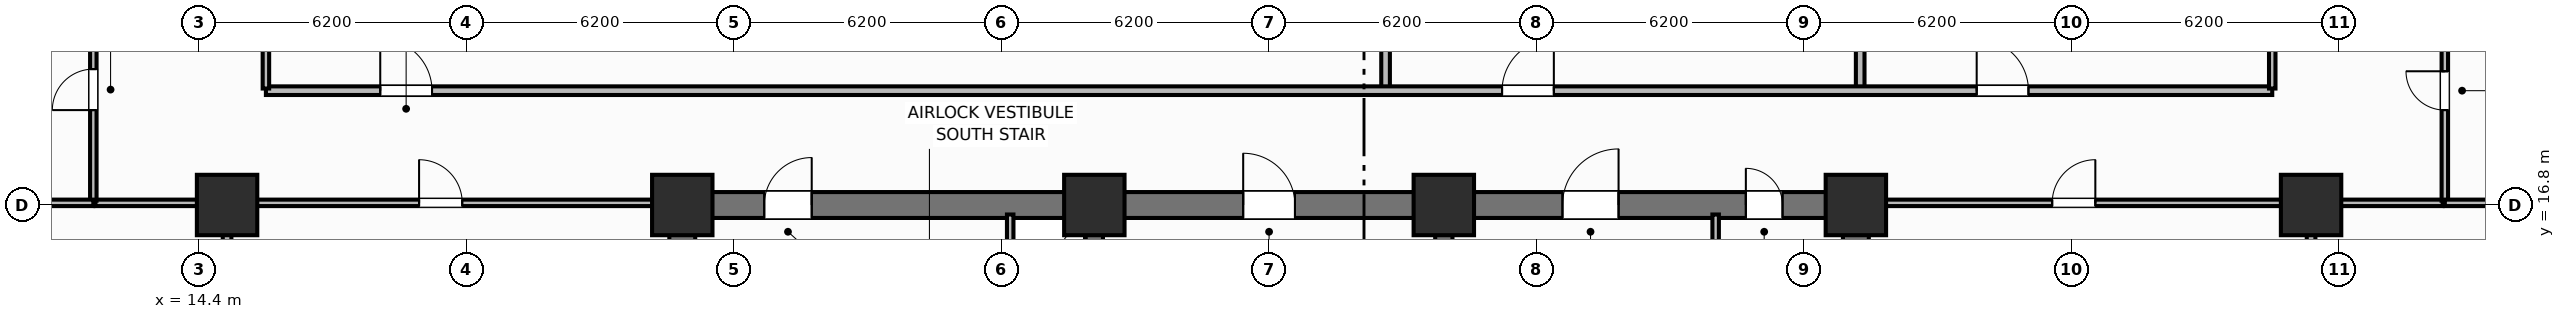
"""IFC4 building model, lengths in metres.
Left out: names, types, materials, properties, quantities, classifications, styles, units other than length and angle.
Written with IfcOpenShell. Run it as: python <this file> out.ifc"""

import sys

from ifc_helpers import new_model, si_unit, direction, frame, frame_2d, origin, origin_2d, place, context, subcontext, project, spatial, rectangle, extrude, element, fill, save


model = new_model("IFC4")
c1 = context("Model", 3, precision=1e-05, world=origin(), true_north=direction((0.0, 1.0)))
c2 = subcontext(c1, "Body", "Model", "MODEL_VIEW")
j1 = project(units=[si_unit("LENGTHUNIT", "METRE"), si_unit("PLANEANGLEUNIT", "RADIAN")], contexts=[c1])
p1 = place(None, origin())
s1 = spatial("IfcSite", under=j1, at=p1, CompositionType="ELEMENT")
p2 = place(p1, origin())
s2 = spatial("IfcBuilding", under=s1, at=p2, CompositionType="ELEMENT")
p3 = place(p2, frame((0.0, 0.0, 11.1)))
s3 = spatial("IfcBuildingStorey", under=s2, at=p3, CompositionType="ELEMENT", Elevation=11.1)
for number, where, z_axis, x_axis in (
    (1, (25.6, 10.9, 0.0), (0.0, 0.0, 1.0), (0.0, 1.0, 0.0)),
    (2, (52.8, 10.9, 0.0), (0.0, 0.0, 1.0), (0.0, 1.0, 0.0)),
):
    element("IfcWall", number, at=place(p3, frame(where, z_axis=z_axis, x_axis=x_axis)), inside=s3, PredefinedType="SHEAR", context=c2, shape_type="SweptSolid", body=[
        extrude(rectangle(XDim=5.6, YDim=0.6, at=frame_2d((2.8, 0.0))), origin(), (0.0, 0.0, 1.0), 4.5),
    ])
p4 = place(p3, frame((25.6, 16.8, 0.0), z_axis=(0.0, 0.0, 1.0), x_axis=(1.0, 0.0, 0.0)))
e3 = element("IfcWall", 3, at=p4, inside=s3, PredefinedType="SHEAR", context=c2, shape_type="SweptSolid", body=[
    extrude(rectangle(XDim=27.2, YDim=0.6, at=frame_2d((13.6, 0.0))), origin(), (0.0, 0.0, 1.0), 4.5),
])
p5 = place(p4, frame((1.9, 0.0, 0.0)))
e4 = element("IfcOpeningElement", 4, at=p5, cuts=e3, PredefinedType="OPENING", context=c2, shape_type="SweptSolid", body=[
    extrude(rectangle(XDim=1.1, YDim=2.15, at=frame_2d((0.55, 1.075))), frame((0.0, 0.31, 0.0), z_axis=(0.0, -1.0, 0.0), x_axis=(1.0, 0.0, 0.0)), (0.0, 0.0, 1.0), 0.62),
])
p6 = place(p4, frame((13.0, 0.0, 0.0)))
e5 = element("IfcOpeningElement", 5, at=p6, cuts=e3, PredefinedType="OPENING", context=c2, shape_type="SweptSolid", body=[
    extrude(rectangle(XDim=1.2, YDim=2.15, at=frame_2d((0.6, 1.075))), frame((0.0, 0.31, 0.0), z_axis=(0.0, -1.0, 0.0), x_axis=(1.0, 0.0, 0.0)), (0.0, 0.0, 1.0), 0.62),
])
p7 = place(p4, frame((20.4, 0.0, 0.0)))
e6 = element("IfcOpeningElement", 6, at=p7, cuts=e3, PredefinedType="OPENING", context=c2, shape_type="SweptSolid", body=[
    extrude(rectangle(XDim=1.3, YDim=2.2, at=frame_2d((0.65, 1.1))), frame((0.0, 0.31, 0.0), z_axis=(0.0, -1.0, 0.0), x_axis=(1.0, 0.0, 0.0)), (0.0, 0.0, 1.0), 0.62),
])
p8 = place(p4, frame((24.65, 0.0, 0.0)))
e7 = element("IfcOpeningElement", 7, at=p8, cuts=e3, PredefinedType="OPENING", context=c2, shape_type="SweptSolid", body=[
    extrude(rectangle(XDim=0.85, YDim=2.1, at=frame_2d((0.425, 1.05))), frame((0.0, 0.31, 0.0), z_axis=(0.0, -1.0, 0.0), x_axis=(1.0, 0.0, 0.0)), (0.0, 0.0, 1.0), 0.62),
])
for number, where, z_axis, x_axis in (
    (8, (35.15, 10.9, 0.0), (0.0, 0.0, 1.0), (0.0, 1.0, 0.0)),
    (9, (43.25, 10.9, 0.0), (0.0, 0.0, 1.0), (0.0, 1.0, 0.0)),
):
    element("IfcWall", number, at=place(p3, frame(where, z_axis=z_axis, x_axis=x_axis)), inside=s3, PredefinedType="SHEAR", context=c2, shape_type="SweptSolid", body=[
        extrude(rectangle(XDim=5.6, YDim=0.4, at=frame_2d((2.8, 0.0))), origin(), (0.0, 0.0, 1.0), 4.5),
    ])
for number, where, z_axis, x_axis in (
    (10, (25.6, 16.8, 0.0), (0.0, 0.0, 1.0), (1.0, 0.0, 0.0)),
    (11, (35.15, 16.8, 0.0), (0.0, 0.0, 1.0), (1.0, 0.0, 0.0)),
    (12, (43.25, 16.8, 0.0), (0.0, 0.0, 1.0), (1.0, 0.0, 0.0)),
    (13, (52.8, 16.8, 0.0), (0.0, 0.0, 1.0), (1.0, 0.0, 0.0)),
    (14, (15.05, 16.8, 0.0), (0.0, 0.0, 1.0), (1.0, 0.0, 0.0)),
    (15, (63.35, 16.8, 0.0), (0.0, 0.0, 1.0), (1.0, 0.0, 0.0)),
):
    element("IfcColumn", number, at=place(p3, frame(where, z_axis=z_axis, x_axis=x_axis)), inside=s3, PredefinedType="COLUMN", context=c2, shape_type="SweptSolid", body=[
        extrude(rectangle(XDim=1.4, YDim=1.4, at=origin_2d()), origin(), (0.0, 0.0, 1.0), 4.5),
    ])
p9 = place(p3, frame((33.2, 14.5, 0.0), z_axis=(0.0, 0.0, 1.0), x_axis=(0.0, 1.0, 0.0)))
e16 = element("IfcWall", 16, at=p9, inside=s3, PredefinedType="PARTITIONING", context=c2, shape_type="SweptSolid", body=[
    extrude(rectangle(XDim=2.08, YDim=0.15, at=frame_2d((1.04, 0.0))), origin(), (0.0, 0.0, 1.0), 3.42),
])
p10 = place(p9, frame((0.55, 0.0, 0.0)))
e17 = element("IfcOpeningElement", 17, at=p10, cuts=e16, PredefinedType="OPENING", context=c2, shape_type="SweptSolid", body=[
    extrude(rectangle(XDim=0.85, YDim=2.05, at=frame_2d((0.425, 1.025))), frame((0.0, 0.085, 0.0), z_axis=(0.0, -1.0, 0.0), x_axis=(1.0, 0.0, 0.0)), (0.0, 0.0, 1.0), 0.17),
])
p11 = place(p3, frame((49.55, 13.7, 0.0), z_axis=(0.0, 0.0, 1.0), x_axis=(0.0, 1.0, 0.0)))
e18 = element("IfcWall", 18, at=p11, inside=s3, PredefinedType="PARTITIONING", context=c2, shape_type="SweptSolid", body=[
    extrude(rectangle(XDim=2.88, YDim=0.15, at=frame_2d((1.44, 0.0))), origin(), (0.0, 0.0, 1.0), 3.42),
])
for number, where, z_axis, x_axis in (
    (19, (41.9, 19.5, 0.0), (0.0, 0.0, 1.0), (0.0, 1.0, 0.0)),
    (20, (52.9, 19.5, 0.0), (0.0, 0.0, 1.0), (0.0, 1.0, 0.0)),
):
    element("IfcWall", number, at=place(p3, frame(where, z_axis=z_axis, x_axis=x_axis)), inside=s3, PredefinedType="PARTITIONING", context=c2, shape_type="SweptSolid", body=[
        extrude(rectangle(XDim=17.4, YDim=0.2, at=frame_2d((8.7, 0.0))), origin(), (0.0, 0.0, 1.0), 3.42),
    ])
p12 = place(p3, frame((15.95, 19.45, 0.0), z_axis=(0.0, 0.0, 1.0), x_axis=(1.0, 0.0, 0.0)))
e21 = element("IfcWall", 21, at=p12, inside=s3, PredefinedType="PARTITIONING", context=c2, shape_type="SweptSolid", body=[
    extrude(rectangle(XDim=46.5, YDim=0.2, at=frame_2d((23.25, 0.0))), origin(), (0.0, 0.0, 1.0), 3.42),
])
p13 = place(p12, frame((2.65, 0.0, 0.0)))
e22 = element("IfcOpeningElement", 22, at=p13, cuts=e21, PredefinedType="OPENING", context=c2, shape_type="SweptSolid", body=[
    extrude(rectangle(XDim=1.2, YDim=2.15, at=frame_2d((0.6, 1.075))), frame((0.0, 0.11, 0.0), z_axis=(0.0, -1.0, 0.0), x_axis=(1.0, 0.0, 0.0)), (0.0, 0.0, 1.0), 0.22),
])
p14 = place(p12, frame((28.65, 0.0, 0.0)))
e23 = element("IfcOpeningElement", 23, at=p14, cuts=e21, PredefinedType="OPENING", context=c2, shape_type="SweptSolid", body=[
    extrude(rectangle(XDim=1.2, YDim=2.15, at=frame_2d((0.6, 1.075))), frame((0.0, 0.11, 0.0), z_axis=(0.0, -1.0, 0.0), x_axis=(1.0, 0.0, 0.0)), (0.0, 0.0, 1.0), 0.22),
])
p15 = place(p12, frame((39.65, 0.0, 0.0)))
e24 = element("IfcOpeningElement", 24, at=p15, cuts=e21, PredefinedType="OPENING", context=c2, shape_type="SweptSolid", body=[
    extrude(rectangle(XDim=1.2, YDim=2.15, at=frame_2d((0.6, 1.075))), frame((0.0, 0.11, 0.0), z_axis=(0.0, -1.0, 0.0), x_axis=(1.0, 0.0, 0.0)), (0.0, 0.0, 1.0), 0.22),
])
for number, where, z_axis, x_axis in (
    (25, (15.95, 19.5, 0.0), (0.0, 0.0, 1.0), (0.0, 1.0, 0.0)),
    (26, (62.45, 19.5, 0.0), (0.0, 0.0, 1.0), (0.0, 1.0, 0.0)),
):
    element("IfcWall", number, at=place(p3, frame(where, z_axis=z_axis, x_axis=x_axis)), inside=s3, PredefinedType="PARTITIONING", context=c2, shape_type="SweptSolid", body=[
        extrude(rectangle(XDim=17.4, YDim=0.15, at=frame_2d((8.7, 0.0))), origin(), (0.0, 0.0, 1.0), 3.42),
    ])
p16 = place(p3, frame((15.05, 0.4, 0.0), z_axis=(0.0, 0.0, 1.0), x_axis=(0.0, 1.0, 0.0)))
e27 = element("IfcWall", 27, at=p16, inside=s3, PredefinedType="PARTITIONING", context=c2, shape_type="SweptSolid", body=[
    extrude(rectangle(XDim=16.4, YDim=0.2, at=frame_2d((8.2, 0.0))), origin(), (0.0, 0.0, 1.0), 3.42),
])
p17 = place(p16, frame((5.5, 0.0, 0.0)))
e28 = element("IfcOpeningElement", 28, at=p17, cuts=e27, PredefinedType="OPENING", context=c2, shape_type="SweptSolid", body=[
    extrude(rectangle(XDim=1.0, YDim=2.15, at=frame_2d((0.5, 1.075))), frame((0.0, 0.11, 0.0), z_axis=(0.0, -1.0, 0.0), x_axis=(1.0, 0.0, 0.0)), (0.0, 0.0, 1.0), 0.22),
])
p18 = place(p3, frame((12.0, 16.85, 0.0), z_axis=(0.0, 0.0, 1.0), x_axis=(1.0, 0.0, 0.0)))
e29 = element("IfcWall", 29, at=p18, inside=s3, PredefinedType="PARTITIONING", context=c2, shape_type="SweptSolid", body=[
    extrude(rectangle(XDim=13.25, YDim=0.15, at=frame_2d((6.625, 0.0))), origin(), (0.0, 0.0, 1.0), 3.42),
])
p19 = place(p18, frame((7.5, 0.0, 0.0)))
e30 = element("IfcOpeningElement", 30, at=p19, cuts=e29, PredefinedType="OPENING", context=c2, shape_type="SweptSolid", body=[
    extrude(rectangle(XDim=1.0, YDim=2.15, at=frame_2d((0.5, 1.075))), frame((0.0, 0.085, 0.0), z_axis=(0.0, -1.0, 0.0), x_axis=(1.0, 0.0, 0.0)), (0.0, 0.0, 1.0), 0.17),
])
p20 = place(p3, frame((11.95, 16.9, 0.0), z_axis=(0.0, 0.0, 1.0), x_axis=(0.0, 1.0, 0.0)))
e31 = element("IfcWall", 31, at=p20, inside=s3, PredefinedType="PARTITIONING", context=c2, shape_type="SweptSolid", body=[
    extrude(rectangle(XDim=5.65, YDim=0.15, at=frame_2d((2.825, 0.0))), origin(), (0.0, 0.0, 1.0), 3.42),
])
p21 = place(p20, frame((2.1, 0.0, 0.0)))
e32 = element("IfcOpeningElement", 32, at=p21, cuts=e31, PredefinedType="OPENING", context=c2, shape_type="SweptSolid", body=[
    extrude(rectangle(XDim=0.95, YDim=2.1, at=frame_2d((0.475, 1.05))), frame((0.0, 0.085, 0.0), z_axis=(0.0, -1.0, 0.0), x_axis=(1.0, 0.0, 0.0)), (0.0, 0.0, 1.0), 0.17),
])
p22 = place(p3, frame((0.4, 16.85, 0.0), z_axis=(0.0, 0.0, 1.0), x_axis=(1.0, 0.0, 0.0)))
e33 = element("IfcWall", 33, at=p22, inside=s3, PredefinedType="PARTITIONING", context=c2, shape_type="SweptSolid", body=[
    extrude(rectangle(XDim=11.55, YDim=0.15, at=frame_2d((5.775, 0.0))), origin(), (0.0, 0.0, 1.0), 3.42),
])
p23 = place(p3, frame((63.35, 0.4, 0.0), z_axis=(0.0, 0.0, 1.0), x_axis=(0.0, 1.0, 0.0)))
e34 = element("IfcWall", 34, at=p23, inside=s3, PredefinedType="PARTITIONING", context=c2, shape_type="SweptSolid", body=[
    extrude(rectangle(XDim=16.4, YDim=0.2, at=frame_2d((8.2, 0.0))), origin(), (0.0, 0.0, 1.0), 3.42),
])
p24 = place(p23, frame((5.5, 0.0, 0.0)))
e35 = element("IfcOpeningElement", 35, at=p24, cuts=e34, PredefinedType="OPENING", context=c2, shape_type="SweptSolid", body=[
    extrude(rectangle(XDim=1.0, YDim=2.15, at=frame_2d((0.5, 1.075))), frame((0.0, 0.11, 0.0), z_axis=(0.0, -1.0, 0.0), x_axis=(1.0, 0.0, 0.0)), (0.0, 0.0, 1.0), 0.22),
])
p25 = place(p3, frame((53.15, 16.85, 0.0), z_axis=(0.0, 0.0, 1.0), x_axis=(1.0, 0.0, 0.0)))
e36 = element("IfcWall", 36, at=p25, inside=s3, PredefinedType="PARTITIONING", context=c2, shape_type="SweptSolid", body=[
    extrude(rectangle(XDim=13.25, YDim=0.15, at=frame_2d((6.625, 0.0))), origin(), (0.0, 0.0, 1.0), 3.42),
])
p26 = place(p25, frame((4.2, 0.0, 0.0)))
e37 = element("IfcOpeningElement", 37, at=p26, cuts=e36, PredefinedType="OPENING", context=c2, shape_type="SweptSolid", body=[
    extrude(rectangle(XDim=1.0, YDim=2.15, at=frame_2d((0.5, 1.075))), frame((0.0, 0.085, 0.0), z_axis=(0.0, -1.0, 0.0), x_axis=(1.0, 0.0, 0.0)), (0.0, 0.0, 1.0), 0.17),
])
p27 = place(p3, frame((66.45, 16.9, 0.0), z_axis=(0.0, 0.0, 1.0), x_axis=(0.0, 1.0, 0.0)))
e38 = element("IfcWall", 38, at=p27, inside=s3, PredefinedType="PARTITIONING", context=c2, shape_type="SweptSolid", body=[
    extrude(rectangle(XDim=5.65, YDim=0.15, at=frame_2d((2.825, 0.0))), origin(), (0.0, 0.0, 1.0), 3.42),
])
p28 = place(p27, frame((2.1, 0.0, 0.0)))
e39 = element("IfcOpeningElement", 39, at=p28, cuts=e38, PredefinedType="OPENING", context=c2, shape_type="SweptSolid", body=[
    extrude(rectangle(XDim=0.9, YDim=2.1, at=frame_2d((0.45, 1.05))), frame((0.0, 0.085, 0.0), z_axis=(0.0, -1.0, 0.0), x_axis=(1.0, 0.0, 0.0)), (0.0, 0.0, 1.0), 0.17),
])
p29 = place(p3, frame((66.45, 16.85, 0.0), z_axis=(0.0, 0.0, 1.0), x_axis=(1.0, 0.0, 0.0)))
e40 = element("IfcWall", 40, at=p29, inside=s3, PredefinedType="PARTITIONING", context=c2, shape_type="SweptSolid", body=[
    extrude(rectangle(XDim=11.55, YDim=0.15, at=frame_2d((5.775, 0.0))), origin(), (0.0, 0.0, 1.0), 3.42),
])
p30 = place(p13, origin())
e41 = element("IfcDoor", 41, at=p30, inside=s3, OperationType="SINGLE_SWING_LEFT", PredefinedType="DOOR", context=c2, shape_type="SweptSolid", body=[
    extrude(rectangle(XDim=1.2, YDim=2.15, at=frame_2d((0.6, 1.075))), frame((0.0, 0.025, 0.0), z_axis=(0.0, -1.0, 0.0), x_axis=(1.0, 0.0, 0.0)), (0.0, 0.0, 1.0), 0.05),
])
fill(e22, e41)
p31 = place(p14, origin())
e42 = element("IfcDoor", 42, at=p31, inside=s3, OperationType="SINGLE_SWING_RIGHT", PredefinedType="DOOR", context=c2, shape_type="SweptSolid", body=[
    extrude(rectangle(XDim=1.2, YDim=2.15, at=frame_2d((0.6, 1.075))), frame((0.0, 0.025, 0.0), z_axis=(0.0, -1.0, 0.0), x_axis=(1.0, 0.0, 0.0)), (0.0, 0.0, 1.0), 0.05),
])
fill(e23, e42)
p32 = place(p15, origin())
e43 = element("IfcDoor", 43, at=p32, inside=s3, OperationType="SINGLE_SWING_LEFT", PredefinedType="DOOR", context=c2, shape_type="SweptSolid", body=[
    extrude(rectangle(XDim=1.2, YDim=2.15, at=frame_2d((0.6, 1.075))), frame((0.0, 0.025, 0.0), z_axis=(0.0, -1.0, 0.0), x_axis=(1.0, 0.0, 0.0)), (0.0, 0.0, 1.0), 0.05),
])
fill(e24, e43)
p33 = place(p19, origin())
e44 = element("IfcDoor", 44, at=p33, inside=s3, OperationType="SINGLE_SWING_LEFT", PredefinedType="DOOR", context=c2, shape_type="SweptSolid", body=[
    extrude(rectangle(XDim=1.0, YDim=2.15, at=frame_2d((0.5, 1.075))), frame((0.0, 0.025, 0.0), z_axis=(0.0, -1.0, 0.0), x_axis=(1.0, 0.0, 0.0)), (0.0, 0.0, 1.0), 0.05),
])
fill(e30, e44)
p34 = place(p21, origin())
e45 = element("IfcDoor", 45, at=p34, inside=s3, OperationType="SINGLE_SWING_LEFT", PredefinedType="DOOR", context=c2, shape_type="SweptSolid", body=[
    extrude(rectangle(XDim=0.95, YDim=2.1, at=frame_2d((0.475, 1.05))), frame((0.0, 0.025, 0.0), z_axis=(0.0, -1.0, 0.0), x_axis=(1.0, 0.0, 0.0)), (0.0, 0.0, 1.0), 0.05),
])
fill(e32, e45)
p35 = place(p26, origin())
e46 = element("IfcDoor", 46, at=p35, inside=s3, OperationType="SINGLE_SWING_RIGHT", PredefinedType="DOOR", context=c2, shape_type="SweptSolid", body=[
    extrude(rectangle(XDim=1.0, YDim=2.15, at=frame_2d((0.5, 1.075))), frame((0.0, 0.025, 0.0), z_axis=(0.0, -1.0, 0.0), x_axis=(1.0, 0.0, 0.0)), (0.0, 0.0, 1.0), 0.05),
])
fill(e37, e46)
p36 = place(p28, origin())
e47 = element("IfcDoor", 47, at=p36, inside=s3, OperationType="SINGLE_SWING_RIGHT", PredefinedType="DOOR", context=c2, shape_type="SweptSolid", body=[
    extrude(rectangle(XDim=0.9, YDim=2.1, at=frame_2d((0.45, 1.05))), frame((0.0, 0.025, 0.0), z_axis=(0.0, -1.0, 0.0), x_axis=(1.0, 0.0, 0.0)), (0.0, 0.0, 1.0), 0.05),
])
fill(e39, e47)
p37 = place(p5, origin())
e48 = element("IfcDoor", 48, at=p37, inside=s3, OperationType="SINGLE_SWING_RIGHT", PredefinedType="DOOR", context=c2, shape_type="SweptSolid", body=[
    extrude(rectangle(XDim=1.1, YDim=2.15, at=frame_2d((0.55, 1.075))), frame((0.0, 0.025, 0.0), z_axis=(0.0, -1.0, 0.0), x_axis=(1.0, 0.0, 0.0)), (0.0, 0.0, 1.0), 0.05),
])
fill(e4, e48)
p38 = place(p6, origin())
e49 = element("IfcDoor", 49, at=p38, inside=s3, OperationType="SINGLE_SWING_LEFT", PredefinedType="DOOR", context=c2, shape_type="SweptSolid", body=[
    extrude(rectangle(XDim=1.2, YDim=2.15, at=frame_2d((0.6, 1.075))), frame((0.0, 0.025, 0.0), z_axis=(0.0, -1.0, 0.0), x_axis=(1.0, 0.0, 0.0)), (0.0, 0.0, 1.0), 0.05),
])
fill(e5, e49)
p39 = place(p7, origin())
e50 = element("IfcDoor", 50, at=p39, inside=s3, OperationType="SINGLE_SWING_RIGHT", PredefinedType="DOOR", context=c2, shape_type="SweptSolid", body=[
    extrude(rectangle(XDim=1.3, YDim=2.2, at=frame_2d((0.65, 1.1))), frame((0.0, 0.025, 0.0), z_axis=(0.0, -1.0, 0.0), x_axis=(1.0, 0.0, 0.0)), (0.0, 0.0, 1.0), 0.05),
])
fill(e6, e50)
p40 = place(p8, origin())
e51 = element("IfcDoor", 51, at=p40, inside=s3, OperationType="SINGLE_SWING_LEFT", PredefinedType="DOOR", context=c2, shape_type="SweptSolid", body=[
    extrude(rectangle(XDim=0.85, YDim=2.1, at=frame_2d((0.425, 1.05))), frame((0.0, 0.025, 0.0), z_axis=(0.0, -1.0, 0.0), x_axis=(1.0, 0.0, 0.0)), (0.0, 0.0, 1.0), 0.05),
])
fill(e7, e51)
save(model, sys.argv[1])
